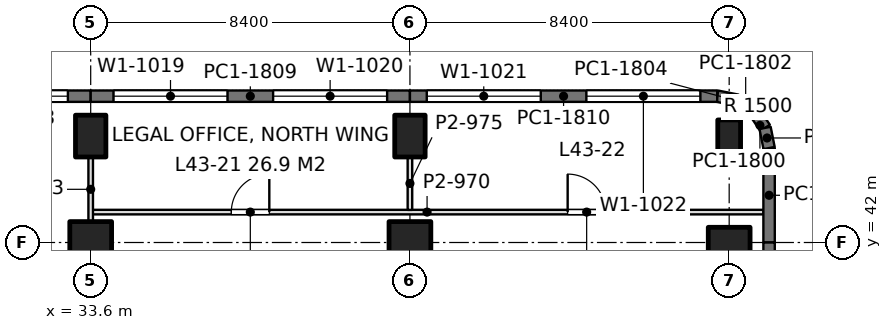
"""IFC4 building model, lengths in metres.
Left out: names, types, materials, properties, quantities, classifications, styles, units other than length and angle.
Written with IfcOpenShell. Run it as: python <this file> out.ifc"""

import sys

from ifc_helpers import new_model, si_unit, direction, frame, frame_2d, origin, origin_2d, place, context, subcontext, project, spatial, rectangle, extrude, element, fill, save


model = new_model("IFC4")
c1 = context("Model", 3, precision=1e-05, world=origin(), true_north=direction((0.0, 1.0)))
c2 = subcontext(c1, "Body", "Model", "MODEL_VIEW")
j1 = project(units=[si_unit("LENGTHUNIT", "METRE"), si_unit("PLANEANGLEUNIT", "RADIAN")], contexts=[c1])
p1 = place(None, origin())
s1 = spatial("IfcSite", under=j1, at=p1, CompositionType="ELEMENT")
p2 = place(p1, origin())
s2 = spatial("IfcBuilding", under=s1, at=p2, CompositionType="ELEMENT")
p3 = place(p2, frame((0.0, 0.0, 190.2)))
s3 = spatial("IfcBuildingStorey", under=s2, at=p3, CompositionType="ELEMENT", Elevation=190.2)
p4 = place(p3, frame((33.6, 42.0, 0.0), z_axis=(0.0, 0.0, 1.0), x_axis=(1.0, 0.0, 0.0)))
e1 = element("IfcColumn", 1, at=p4, inside=s3, PredefinedType="COLUMN", context=c2, shape_type="SweptSolid", body=[
    extrude(rectangle(XDim=1.1, YDim=1.1, at=origin_2d()), origin(), (0.0, 0.0, 1.0), 4.2),
])
p5 = place(p3, frame((33.6, 44.8, 0.0), z_axis=(0.0, 0.0, 1.0), x_axis=(1.0, 0.0, 0.0)))
e2 = element("IfcColumn", 2, at=p5, inside=s3, PredefinedType="COLUMN", context=c2, shape_type="SweptSolid", body=[
    extrude(rectangle(XDim=0.8, YDim=1.1, at=origin_2d()), origin(), (0.0, 0.0, 1.0), 4.2),
])
p6 = place(p3, frame((42.0, 42.0, 0.0), z_axis=(0.0, 0.0, 1.0), x_axis=(1.0, 0.0, 0.0)))
e3 = element("IfcColumn", 3, at=p6, inside=s3, PredefinedType="COLUMN", context=c2, shape_type="SweptSolid", body=[
    extrude(rectangle(XDim=1.1, YDim=1.1, at=origin_2d()), origin(), (0.0, 0.0, 1.0), 4.2),
])
for number, where, z_axis, x_axis in (
    (4, (42.0, 44.8, 0.0), (0.0, 0.0, 1.0), (1.0, 0.0, 0.0)),
    (5, (50.4, 42.0, 0.0), (0.0, 0.0, 1.0), (0.0, 1.0, 0.0)),
):
    element("IfcColumn", number, at=place(p3, frame(where, z_axis=z_axis, x_axis=x_axis)), inside=s3, PredefinedType="COLUMN", context=c2, shape_type="SweptSolid", body=[
        extrude(rectangle(XDim=0.8, YDim=1.1, at=origin_2d()), origin(), (0.0, 0.0, 1.0), 4.2),
    ])
p7 = place(p3, frame((50.4, 44.8, 0.0), z_axis=(0.0, 0.0, 1.0), x_axis=(1.0, 0.0, 0.0)))
e6 = element("IfcColumn", 6, at=p7, inside=s3, PredefinedType="COLUMN", context=c2, shape_type="SweptSolid", body=[
    extrude(rectangle(XDim=0.6, YDim=0.85, at=origin_2d()), origin(), (0.0, 0.0, 1.0), 4.2),
])
p8 = place(p3, frame((25.2, 45.85, 0.0), z_axis=(0.0, 0.0, 1.0), x_axis=(1.0, 0.0, 0.0)))
e7 = element("IfcWall", 7, at=p8, inside=s3, PredefinedType="SOLIDWALL", context=c2, shape_type="SweptSolid", body=[
    extrude(rectangle(XDim=8.4, YDim=0.3, at=frame_2d((4.2, 0.0))), origin(), (0.0, 0.0, 1.0), 4.05),
])
p9 = place(p8, frame((0.6, 0.0, 0.9)))
e8 = element("IfcOpeningElement", 8, at=p9, cuts=e7, PredefinedType="OPENING", context=c2, shape_type="SweptSolid", body=[
    extrude(rectangle(XDim=3.0, YDim=1.9, at=frame_2d((1.5, 0.95))), frame((0.0, 0.16, 0.0), z_axis=(0.0, -1.0, 0.0), x_axis=(1.0, 0.0, 0.0)), (0.0, 0.0, 1.0), 0.32),
])
p10 = place(p8, frame((4.8, 0.0, 0.9)))
e9 = element("IfcOpeningElement", 9, at=p10, cuts=e7, PredefinedType="OPENING", context=c2, shape_type="SweptSolid", body=[
    extrude(rectangle(XDim=3.0, YDim=1.9, at=frame_2d((1.5, 0.95))), frame((0.0, 0.16, 0.0), z_axis=(0.0, -1.0, 0.0), x_axis=(1.0, 0.0, 0.0)), (0.0, 0.0, 1.0), 0.32),
])
p11 = place(p3, frame((33.6, 45.85, 0.0), z_axis=(0.0, 0.0, 1.0), x_axis=(1.0, 0.0, 0.0)))
e10 = element("IfcWall", 10, at=p11, inside=s3, PredefinedType="SOLIDWALL", context=c2, shape_type="SweptSolid", body=[
    extrude(rectangle(XDim=8.4, YDim=0.3, at=frame_2d((4.2, 0.0))), origin(), (0.0, 0.0, 1.0), 4.05),
])
p12 = place(p11, frame((0.6, 0.0, 0.9)))
e11 = element("IfcOpeningElement", 11, at=p12, cuts=e10, PredefinedType="OPENING", context=c2, shape_type="SweptSolid", body=[
    extrude(rectangle(XDim=3.0, YDim=1.9, at=frame_2d((1.5, 0.95))), frame((0.0, 0.16, 0.0), z_axis=(0.0, -1.0, 0.0), x_axis=(1.0, 0.0, 0.0)), (0.0, 0.0, 1.0), 0.32),
])
p13 = place(p11, frame((4.8, 0.0, 0.9)))
e12 = element("IfcOpeningElement", 12, at=p13, cuts=e10, PredefinedType="OPENING", context=c2, shape_type="SweptSolid", body=[
    extrude(rectangle(XDim=3.0, YDim=1.9, at=frame_2d((1.5, 0.95))), frame((0.0, 0.16, 0.0), z_axis=(0.0, -1.0, 0.0), x_axis=(1.0, 0.0, 0.0)), (0.0, 0.0, 1.0), 0.32),
])
p14 = place(p3, frame((42.0, 45.85, 0.0), z_axis=(0.0, 0.0, 1.0), x_axis=(1.0, 0.0, 0.0)))
e13 = element("IfcWall", 13, at=p14, inside=s3, PredefinedType="SOLIDWALL", context=c2, shape_type="SweptSolid", body=[
    extrude(rectangle(XDim=8.085, YDim=0.3, at=frame_2d((4.042, 0.0))), origin(), (0.0, 0.0, 1.0), 4.05),
])
p15 = place(p14, frame((0.443, 0.0, 0.9)))
e14 = element("IfcOpeningElement", 14, at=p15, cuts=e13, PredefinedType="OPENING", context=c2, shape_type="SweptSolid", body=[
    extrude(rectangle(XDim=3.0, YDim=1.9, at=frame_2d((1.5, 0.95))), frame((0.0, 0.16, 0.0), z_axis=(0.0, -1.0, 0.0), x_axis=(1.0, 0.0, 0.0)), (0.0, 0.0, 1.0), 0.32),
])
p16 = place(p14, frame((4.643, 0.0, 0.9)))
e15 = element("IfcOpeningElement", 15, at=p16, cuts=e13, PredefinedType="OPENING", context=c2, shape_type="SweptSolid", body=[
    extrude(rectangle(XDim=3.0, YDim=1.9, at=frame_2d((1.5, 0.95))), frame((0.0, 0.16, 0.0), z_axis=(0.0, -1.0, 0.0), x_axis=(1.0, 0.0, 0.0)), (0.0, 0.0, 1.0), 0.32),
])
p17 = place(p3, frame((50.085, 45.85, 0.0), z_axis=(0.0, 0.0, 1.0), x_axis=(0.980702050465, -0.1955082817, 0.0)))
e16 = element("IfcWall", 16, at=p17, inside=s3, PredefinedType="SOLIDWALL", context=c2, shape_type="SweptSolid", body=[
    extrude(rectangle(XDim=0.541, YDim=0.3, at=frame_2d((0.271, 0.0))), origin(), (0.0, 0.0, 1.0), 4.05),
])
p18 = place(p3, frame((50.615, 45.744, 0.0), z_axis=(0.0, 0.0, 1.0), x_axis=(0.831692711774, -0.555236195849, 0.0)))
e17 = element("IfcWall", 17, at=p18, inside=s3, PredefinedType="SOLIDWALL", context=c2, shape_type="SweptSolid", body=[
    extrude(rectangle(XDim=0.525, YDim=0.3, at=frame_2d((0.263, 0.0))), origin(), (0.0, 0.0, 1.0), 4.05),
])
p19 = place(p3, frame((51.052, 45.453, 0.0), z_axis=(0.0, 0.0, 1.0), x_axis=(0.55534295404, -0.831621430339, 0.0)))
e18 = element("IfcWall", 18, at=p19, inside=s3, PredefinedType="SOLIDWALL", context=c2, shape_type="SweptSolid", body=[
    extrude(rectangle(XDim=0.526, YDim=0.3, at=frame_2d((0.263, 0.0))), origin(), (0.0, 0.0, 1.0), 4.05),
])
p20 = place(p3, frame((51.344, 45.015, 0.0), z_axis=(0.0, 0.0, 1.0), x_axis=(0.195073962632, -0.980788534345, 0.0)))
e19 = element("IfcWall", 19, at=p20, inside=s3, PredefinedType="SOLIDWALL", context=c2, shape_type="SweptSolid", body=[
    extrude(rectangle(XDim=0.541, YDim=0.3, at=frame_2d((0.271, 0.0))), origin(), (0.0, 0.0, 1.0), 4.05),
])
p21 = place(p3, frame((51.45, 44.485, 0.0), z_axis=(0.0, 0.0, 1.0), x_axis=(0.0, -1.0, 0.0)))
e20 = element("IfcWall", 20, at=p21, inside=s3, PredefinedType="SOLIDWALL", context=c2, shape_type="SweptSolid", body=[
    extrude(rectangle(XDim=2.485, YDim=0.3, at=frame_2d((1.243, 0.0))), origin(), (0.0, 0.0, 1.0), 4.05),
])
p22 = place(p3, frame((51.45, 42.0, 0.0), z_axis=(0.0, 0.0, 1.0), x_axis=(0.0, -1.0, 0.0)))
e21 = element("IfcWall", 21, at=p22, inside=s3, PredefinedType="SOLIDWALL", context=c2, shape_type="SweptSolid", body=[
    extrude(rectangle(XDim=4.275, YDim=0.3, at=frame_2d((2.137, 0.0))), origin(), (0.0, 0.0, 1.0), 4.05),
])
p23 = place(p22, frame((0.938, 0.0, 0.9)))
e22 = element("IfcOpeningElement", 22, at=p23, cuts=e21, PredefinedType="OPENING", context=c2, shape_type="SweptSolid", body=[
    extrude(rectangle(XDim=2.4, YDim=1.9, at=frame_2d((1.2, 0.95))), frame((0.0, 0.16, 0.0), z_axis=(0.0, -1.0, 0.0), x_axis=(1.0, 0.0, 0.0)), (0.0, 0.0, 1.0), 0.32),
])
p24 = place(p3, frame((33.6, 42.8, 0.0), z_axis=(0.0, 0.0, 1.0), x_axis=(1.0, 0.0, 0.0)))
e23 = element("IfcWall", 23, at=p24, inside=s3, PredefinedType="PARTITIONING", context=c2, shape_type="SweptSolid", body=[
    extrude(rectangle(XDim=17.702, YDim=0.12, at=frame_2d((8.851, 0.0))), origin(), (0.0, 0.0, 1.0), 3.56),
])
p25 = place(p24, frame((3.7, 0.0, 0.0)))
e24 = element("IfcOpeningElement", 24, at=p25, cuts=e23, PredefinedType="OPENING", context=c2, shape_type="SweptSolid", body=[
    extrude(rectangle(XDim=1.0, YDim=2.4, at=frame_2d((0.5, 1.2))), frame((0.0, 0.07, 0.0), z_axis=(0.0, -1.0, 0.0), x_axis=(1.0, 0.0, 0.0)), (0.0, 0.0, 1.0), 0.14),
])
p26 = place(p24, frame((12.55, 0.0, 0.0)))
e25 = element("IfcOpeningElement", 25, at=p26, cuts=e23, PredefinedType="OPENING", context=c2, shape_type="SweptSolid", body=[
    extrude(rectangle(XDim=1.0, YDim=2.4, at=frame_2d((0.5, 1.2))), frame((0.0, 0.07, 0.0), z_axis=(0.0, -1.0, 0.0), x_axis=(1.0, 0.0, 0.0)), (0.0, 0.0, 1.0), 0.14),
])
p27 = place(p3, frame((33.6, 42.548, 0.0), z_axis=(0.0, 0.0, 1.0), x_axis=(0.0, 1.0, 0.0)))
e26 = element("IfcWall", 26, at=p27, inside=s3, PredefinedType="PARTITIONING", context=c2, shape_type="SweptSolid", body=[
    extrude(rectangle(XDim=1.703, YDim=0.12, at=frame_2d((0.852, 0.0))), origin(), (0.0, 0.0, 1.0), 3.69),
])
p28 = place(p3, frame((42.0, 42.858, 0.0), z_axis=(0.0, 0.0, 1.0), x_axis=(0.0, 1.0, 0.0)))
e27 = element("IfcWall", 27, at=p28, inside=s3, PredefinedType="PARTITIONING", context=c2, shape_type="SweptSolid", body=[
    extrude(rectangle(XDim=1.393, YDim=0.12, at=frame_2d((0.697, 0.0))), origin(), (0.0, 0.0, 1.0), 3.69),
])
p29 = place(p10, origin())
e28 = element("IfcWindow", 28, at=p29, inside=s3, PartitioningType="SINGLE_PANEL", PredefinedType="WINDOW", context=c2, shape_type="SweptSolid", body=[
    extrude(rectangle(XDim=3.0, YDim=1.9, at=frame_2d((1.5, 0.95))), frame((0.0, 0.03, 0.0), z_axis=(0.0, -1.0, 0.0), x_axis=(1.0, 0.0, 0.0)), (0.0, 0.0, 1.0), 0.06),
])
fill(e9, e28)
p30 = place(p12, origin())
e29 = element("IfcWindow", 29, at=p30, inside=s3, PartitioningType="SINGLE_PANEL", PredefinedType="WINDOW", context=c2, shape_type="SweptSolid", body=[
    extrude(rectangle(XDim=3.0, YDim=1.9, at=frame_2d((1.5, 0.95))), frame((0.0, 0.03, 0.0), z_axis=(0.0, -1.0, 0.0), x_axis=(1.0, 0.0, 0.0)), (0.0, 0.0, 1.0), 0.06),
])
fill(e11, e29)
p31 = place(p13, origin())
e30 = element("IfcWindow", 30, at=p31, inside=s3, PartitioningType="SINGLE_PANEL", PredefinedType="WINDOW", context=c2, shape_type="SweptSolid", body=[
    extrude(rectangle(XDim=3.0, YDim=1.9, at=frame_2d((1.5, 0.95))), frame((0.0, 0.03, 0.0), z_axis=(0.0, -1.0, 0.0), x_axis=(1.0, 0.0, 0.0)), (0.0, 0.0, 1.0), 0.06),
])
fill(e12, e30)
p32 = place(p15, origin())
e31 = element("IfcWindow", 31, at=p32, inside=s3, PartitioningType="SINGLE_PANEL", PredefinedType="WINDOW", context=c2, shape_type="SweptSolid", body=[
    extrude(rectangle(XDim=3.0, YDim=1.9, at=frame_2d((1.5, 0.95))), frame((0.0, 0.03, 0.0), z_axis=(0.0, -1.0, 0.0), x_axis=(1.0, 0.0, 0.0)), (0.0, 0.0, 1.0), 0.06),
])
fill(e14, e31)
p33 = place(p16, origin())
e32 = element("IfcWindow", 32, at=p33, inside=s3, PartitioningType="SINGLE_PANEL", PredefinedType="WINDOW", context=c2, shape_type="SweptSolid", body=[
    extrude(rectangle(XDim=3.0, YDim=1.9, at=frame_2d((1.5, 0.95))), frame((0.0, 0.03, 0.0), z_axis=(0.0, -1.0, 0.0), x_axis=(1.0, 0.0, 0.0)), (0.0, 0.0, 1.0), 0.06),
])
fill(e15, e32)
p34 = place(p25, origin())
e33 = element("IfcDoor", 33, at=p34, inside=s3, OperationType="SINGLE_SWING_RIGHT", PredefinedType="DOOR", context=c2, shape_type="SweptSolid", body=[
    extrude(rectangle(XDim=1.0, YDim=2.4, at=frame_2d((0.5, 1.2))), frame((0.0, 0.025, 0.0), z_axis=(0.0, -1.0, 0.0), x_axis=(1.0, 0.0, 0.0)), (0.0, 0.0, 1.0), 0.05),
])
fill(e24, e33)
p35 = place(p26, origin())
e34 = element("IfcDoor", 34, at=p35, inside=s3, OperationType="SINGLE_SWING_LEFT", PredefinedType="DOOR", context=c2, shape_type="SweptSolid", body=[
    extrude(rectangle(XDim=1.0, YDim=2.4, at=frame_2d((0.5, 1.2))), frame((0.0, 0.025, 0.0), z_axis=(0.0, -1.0, 0.0), x_axis=(1.0, 0.0, 0.0)), (0.0, 0.0, 1.0), 0.05),
])
fill(e25, e34)
save(model, sys.argv[1])
